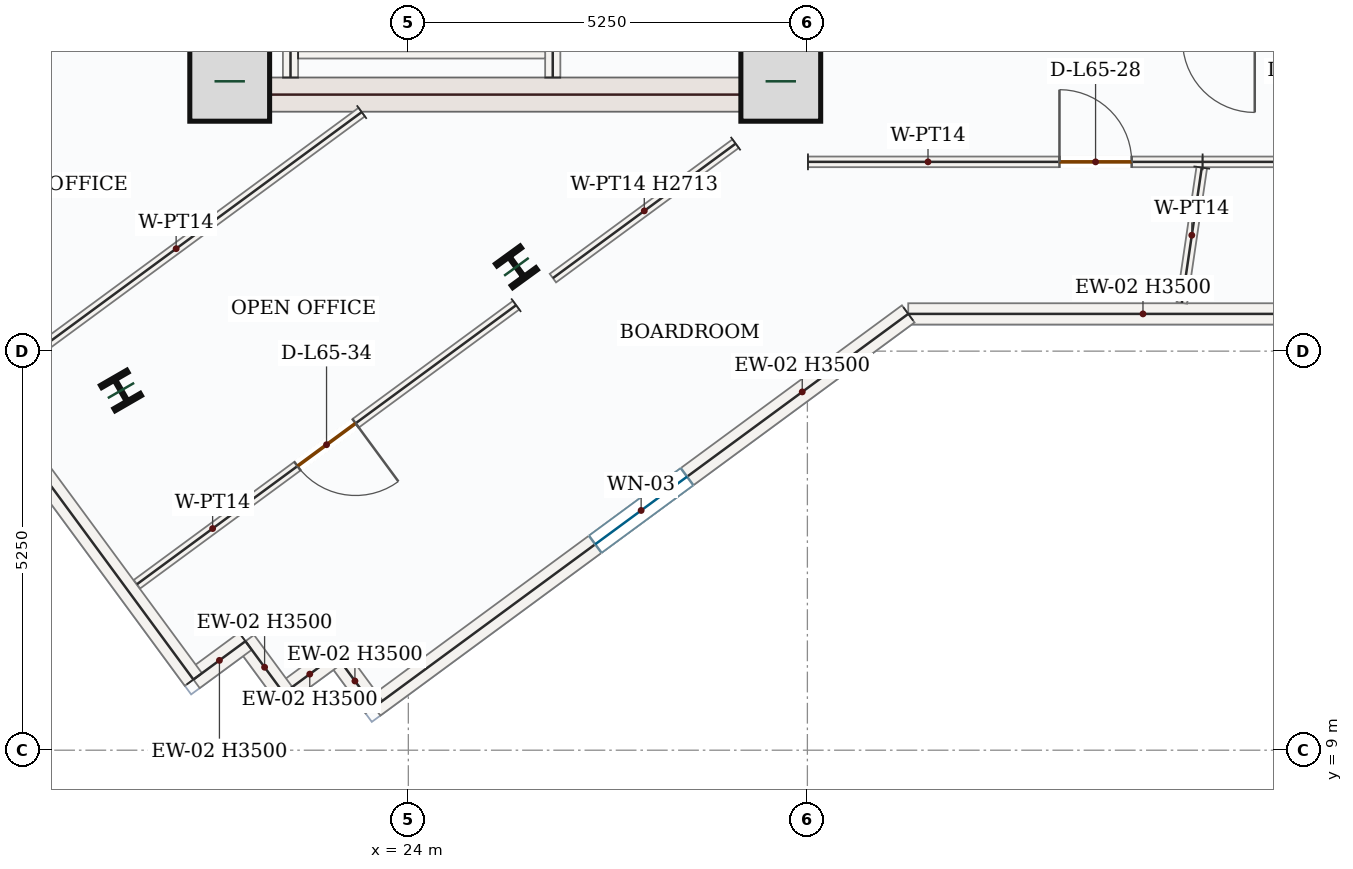
"""IFC4 building model, lengths in metres.
Left out: names, types, materials, properties, quantities, classifications, styles, units other than length and angle.
Written with IfcOpenShell. Run it as: python <this file> out.ifc"""

import sys

from ifc_helpers import new_model, si_unit, direction, frame, frame_2d, origin, origin_2d, place, context, subcontext, project, spatial, rectangle, i_section, extrude, source, transform, mapped, element, fill, save


model = new_model("IFC4")
c1 = context("Model", 3, precision=1e-05, world=origin(), true_north=direction((0.0, 1.0)))
c2 = subcontext(c1, "Body", "Model", "MODEL_VIEW")
j1 = project(units=[si_unit("LENGTHUNIT", "METRE"), si_unit("PLANEANGLEUNIT", "RADIAN")], contexts=[c1])
p1 = place(None, origin())
s1 = spatial("IfcSite", under=j1, at=p1, CompositionType="ELEMENT")
p2 = place(p1, origin())
s2 = spatial("IfcBuilding", under=s1, at=p2, CompositionType="ELEMENT")
p3 = place(p2, frame((0.0, 0.0, 272.85)))
s3 = spatial("IfcBuildingStorey", under=s2, at=p3, CompositionType="ELEMENT", Elevation=272.85)
m1 = source(origin(), c2, "Body", "SweptSolid", [
    extrude(rectangle(XDim=8.55, YDim=0.45, at=frame_2d((4.275, 0.0))), origin(), (0.0, 0.0, 1.0), 3.5),
])
p4 = place(p3, frame((21.475, 17.4, 0.0), z_axis=(0.0, 0.0, 1.0), x_axis=(0.0, 1.0, 0.0)))
e1 = element("IfcWall", 1, at=p4, inside=s3, PredefinedType="SHEAR", context=c2, shape_type="MappedRepresentation", body=[
    mapped(m1, transform((0.0, 0.0, 0.0), x_axis=(1.0, 0.0, 0.0), y_axis=(0.0, 1.0, 0.0), z_axis=(0.0, 0.0, 1.0), scale=1.0)),
])
p5 = place(p3, frame((29.025, 17.4, 0.0), z_axis=(0.0, 0.0, 1.0), x_axis=(0.0, 1.0, 0.0)))
e2 = element("IfcWall", 2, at=p5, inside=s3, PredefinedType="SHEAR", context=c2, shape_type="SweptSolid", body=[
    extrude(rectangle(XDim=8.55, YDim=0.45, at=frame_2d((4.275, 0.0))), origin(), (0.0, 0.0, 1.0), 3.5),
])
p6 = place(p5, frame((6.65, 0.0, 0.0)))
e3 = element("IfcOpeningElement", 3, at=p6, cuts=e2, PredefinedType="OPENING", context=c2, shape_type="SweptSolid", body=[
    extrude(rectangle(XDim=1.1, YDim=2.2, at=frame_2d((0.55, 1.1))), frame((0.0, 0.235, 0.0), z_axis=(0.0, -1.0, 0.0), x_axis=(1.0, 0.0, 0.0)), (0.0, 0.0, 1.0), 0.47),
])
p7 = place(p5, frame((2.7, 0.0, 0.0)))
e4 = element("IfcOpeningElement", 4, at=p7, cuts=e2, PredefinedType="OPENING", context=c2, shape_type="SweptSolid", body=[
    extrude(rectangle(XDim=0.88, YDim=2.1, at=frame_2d((0.44, 1.05))), frame((0.0, 0.235, 0.0), z_axis=(0.0, -1.0, 0.0), x_axis=(1.0, 0.0, 0.0)), (0.0, 0.0, 1.0), 0.47),
])
p8 = place(p5, frame((4.6, 0.0, 0.0)))
e5 = element("IfcOpeningElement", 5, at=p8, cuts=e2, PredefinedType="OPENING", context=c2, shape_type="SweptSolid", body=[
    extrude(rectangle(XDim=0.88, YDim=2.1, at=frame_2d((0.44, 1.05))), frame((0.0, 0.235, 0.0), z_axis=(0.0, -1.0, 0.0), x_axis=(1.0, 0.0, 0.0)), (0.0, 0.0, 1.0), 0.47),
])
m2 = source(origin(), c2, "Body", "SweptSolid", [
    extrude(rectangle(XDim=7.1, YDim=0.45, at=frame_2d((3.55, 0.0))), origin(), (0.0, 0.0, 1.0), 3.5),
])
p9 = place(p3, frame((21.7, 17.625, 0.0), z_axis=(0.0, 0.0, 1.0), x_axis=(1.0, 0.0, 0.0)))
e6 = element("IfcWall", 6, at=p9, inside=s3, PredefinedType="SHEAR", context=c2, shape_type="MappedRepresentation", body=[
    mapped(m2, transform((0.0, 0.0, 0.0), x_axis=(1.0, 0.0, 0.0), y_axis=(0.0, 1.0, 0.0), z_axis=(0.0, 0.0, 1.0), scale=1.0)),
])
m3 = source(origin(), c2, "Body", "SweptSolid", [
    extrude(rectangle(XDim=1.05, YDim=1.05, at=origin_2d()), origin(), (0.0, 0.0, 1.0), 3.75),
])
for number, where, z_axis, x_axis in (
    (7, (21.65, 17.8, 0.0), (0.0, 0.0, 1.0), (1.0, 0.0, 0.0)),
    (8, (28.9, 17.8, 0.0), (0.0, 0.0, 1.0), (1.0, 0.0, 0.0)),
):
    element("IfcColumn", number, at=place(p3, frame(where, z_axis=z_axis, x_axis=x_axis)), inside=s3, PredefinedType="COLUMN", context=c2, shape_type="MappedRepresentation", body=[
        mapped(m3, transform((0.0, 0.0, 0.0), x_axis=(1.0, 0.0, 0.0), y_axis=(0.0, 1.0, 0.0), z_axis=(0.0, 0.0, 1.0), scale=1.0)),
    ])
m4 = source(origin(), c2, "Body", "SweptSolid", [
    extrude(i_section(OverallWidth=0.399, OverallDepth=0.386, WebThickness=0.021, FlangeThickness=0.033, FilletRadius=0.018, at=origin_2d()), origin(), (0.0, 0.0, 1.0), 3.75),
])
for number, where, z_axis, x_axis in (
    (9, (25.422, 15.359, 0.0), (0.0, 0.0, 1.0), (0.809, 0.588, 0.0)),
    (10, (20.22, 13.732, 0.0), (0.0, 0.0, 1.0), (0.866, 0.5, 0.0)),
):
    element("IfcColumn", number, at=place(p3, frame(where, z_axis=z_axis, x_axis=x_axis)), inside=s3, PredefinedType="COLUMN", context=c2, shape_type="MappedRepresentation", body=[
        mapped(m4, transform((0.0, 0.0, 0.0), x_axis=(1.0, 0.0, 0.0), y_axis=(0.0, 1.0, 0.0), z_axis=(0.0, 0.0, 1.0), scale=1.0)),
    ])
m5 = source(origin(), c2, "Body", "SweptSolid", [
    extrude(rectangle(XDim=6.177, YDim=0.28, at=frame_2d((3.088, 0.0))), origin(), (0.0, 0.0, 1.0), 3.5),
])
p10 = place(p3, frame((36.753, 14.74, 0.0), z_axis=(0.0, 0.0, 1.0), x_axis=(-1.0, 0.0, 0.0)))
e11 = element("IfcWall", 11, at=p10, inside=s3, PredefinedType="SOLIDWALL", context=c2, shape_type="MappedRepresentation", body=[
    mapped(m5, transform((0.0, 0.0, 0.0), x_axis=(1.0, 0.0, 0.0), y_axis=(0.0, 1.0, 0.0), z_axis=(0.0, 0.0, 1.0), scale=1.0)),
])
p11 = place(p3, frame((30.577, 14.74, 0.0), z_axis=(0.0, 0.0, 1.0), x_axis=(-0.805403112922, -0.592727446383, 0.0)))
e12 = element("IfcWall", 12, at=p11, inside=s3, PredefinedType="SOLIDWALL", context=c2, shape_type="SweptSolid", body=[
    extrude(rectangle(XDim=8.726, YDim=0.28, at=frame_2d((4.363, 0.0))), origin(), (0.0, 0.0, 1.0), 3.5),
])
p12 = place(p11, frame((3.613, 0.0, 0.85)))
e13 = element("IfcOpeningElement", 13, at=p12, cuts=e12, PredefinedType="OPENING", context=c2, shape_type="SweptSolid", body=[
    extrude(rectangle(XDim=1.5, YDim=1.5, at=frame_2d((0.75, 0.75))), frame((0.0, 0.15, 0.0), z_axis=(0.0, -1.0, 0.0), x_axis=(1.0, 0.0, 0.0)), (0.0, 0.0, 1.0), 0.3),
])
m6 = source(origin(), c2, "Body", "SweptSolid", [
    extrude(rectangle(XDim=0.85, YDim=0.28, at=frame_2d((0.425, 0.0))), origin(), (0.0, 0.0, 1.0), 3.5),
])
p13 = place(p3, frame((23.549, 9.568, 0.0), z_axis=(0.0, 0.0, 1.0), x_axis=(-0.592807079659, 0.80534450163, 0.0)))
e14 = element("IfcWall", 14, at=p13, inside=s3, PredefinedType="SOLIDWALL", context=c2, shape_type="MappedRepresentation", body=[
    mapped(m6, transform((0.0, 0.0, 0.0), x_axis=(1.0, 0.0, 0.0), y_axis=(0.0, 1.0, 0.0), z_axis=(0.0, 0.0, 1.0), scale=1.0)),
])
m7 = source(origin(), c2, "Body", "SweptSolid", [
    extrude(rectangle(XDim=0.85, YDim=0.28, at=frame_2d((0.425, 0.0))), origin(), (0.0, 0.0, 1.0), 3.5),
])
for number, where, z_axis, x_axis in (
    (15, (23.045, 10.253, 0.0), (0.0, 0.0, 1.0), (-0.805, -0.593, 0.0)),
    (16, (22.361, 9.749, 0.0), (0.0, 0.0, 1.0), (-0.593, 0.805, 0.0)),
):
    element("IfcWall", number, at=place(p3, frame(where, z_axis=z_axis, x_axis=x_axis)), inside=s3, PredefinedType="SOLIDWALL", context=c2, shape_type="MappedRepresentation", body=[
        mapped(m7, transform((0.0, 0.0, 0.0), x_axis=(1.0, 0.0, 0.0), y_axis=(0.0, 1.0, 0.0), z_axis=(0.0, 0.0, 1.0), scale=1.0)),
    ])
p14 = place(p3, frame((21.857, 10.434, 0.0), z_axis=(0.0, 0.0, 1.0), x_axis=(-0.80534450163, -0.592807079659, 0.0)))
e17 = element("IfcWall", 17, at=p14, inside=s3, PredefinedType="SOLIDWALL", context=c2, shape_type="MappedRepresentation", body=[
    mapped(m6, transform((0.0, 0.0, 0.0), x_axis=(1.0, 0.0, 0.0), y_axis=(0.0, 1.0, 0.0), z_axis=(0.0, 0.0, 1.0), scale=1.0)),
])
m8 = source(origin(), c2, "Body", "SweptSolid", [
    extrude(rectangle(XDim=9.92, YDim=0.28, at=frame_2d((4.96, 0.0))), origin(), (0.0, 0.0, 1.0), 3.5),
])
p15 = place(p3, frame((21.173, 9.93, 0.0), z_axis=(0.0, 0.0, 1.0), x_axis=(-0.592722097771, 0.805407049146, 0.0)))
e18 = element("IfcWall", 18, at=p15, inside=s3, PredefinedType="SOLIDWALL", context=c2, shape_type="MappedRepresentation", body=[
    mapped(m8, transform((0.0, 0.0, 0.0), x_axis=(1.0, 0.0, 0.0), y_axis=(0.0, 1.0, 0.0), z_axis=(0.0, 0.0, 1.0), scale=1.0)),
])
m9 = source(origin(), c2, "Body", "SweptSolid", [
    extrude(rectangle(XDim=7.87, YDim=0.2, at=frame_2d((3.935, 0.0))), origin(), (0.0, 0.0, 1.0), 3.5),
])
p16 = place(p3, frame((22.45, 17.85, 0.0), z_axis=(0.0, 0.0, 1.0), x_axis=(0.0, 1.0, 0.0)))
e19 = element("IfcWall", 19, at=p16, inside=s3, PredefinedType="SOLIDWALL", context=c2, shape_type="MappedRepresentation", body=[
    mapped(m9, transform((0.0, 0.0, 0.0), x_axis=(1.0, 0.0, 0.0), y_axis=(0.0, 1.0, 0.0), z_axis=(0.0, 0.0, 1.0), scale=1.0)),
])
p17 = place(p3, frame((25.9, 17.85, 0.0), z_axis=(0.0, 0.0, 1.0), x_axis=(0.0, 1.0, 0.0)))
e20 = element("IfcWall", 20, at=p17, inside=s3, PredefinedType="SOLIDWALL", context=c2, shape_type="SweptSolid", body=[
    extrude(rectangle(XDim=8.0, YDim=0.2, at=frame_2d((4.0, 0.0))), origin(), (0.0, 0.0, 1.0), 3.5),
])
p18 = place(p17, frame((6.2, 0.0, 0.0)))
e21 = element("IfcOpeningElement", 21, at=p18, cuts=e20, PredefinedType="OPENING", context=c2, shape_type="SweptSolid", body=[
    extrude(rectangle(XDim=1.0, YDim=2.15, at=frame_2d((0.5, 1.075))), frame((0.0, 0.11, 0.0), z_axis=(0.0, -1.0, 0.0), x_axis=(1.0, 0.0, 0.0)), (0.0, 0.0, 1.0), 0.22),
])
p19 = place(p17, frame((0.6, 0.0, 0.0)))
e22 = element("IfcOpeningElement", 22, at=p19, cuts=e20, PredefinedType="OPENING", context=c2, shape_type="SweptSolid", body=[
    extrude(rectangle(XDim=0.88, YDim=2.1, at=frame_2d((0.44, 1.05))), frame((0.0, 0.11, 0.0), z_axis=(0.0, -1.0, 0.0), x_axis=(1.0, 0.0, 0.0)), (0.0, 0.0, 1.0), 0.22),
])
m10 = source(origin(), c2, "Body", "SweptSolid", [
    extrude(rectangle(XDim=3.25, YDim=0.2, at=frame_2d((1.625, 0.0))), origin(), (0.0, 0.0, 1.0), 3.5),
])
p20 = place(p3, frame((22.55, 18.2, 0.0), z_axis=(0.0, 0.0, 1.0), x_axis=(1.0, 0.0, 0.0)))
e23 = element("IfcWall", 23, at=p20, inside=s3, PredefinedType="SOLIDWALL", context=c2, shape_type="MappedRepresentation", body=[
    mapped(m10, transform((0.0, 0.0, 0.0), x_axis=(1.0, 0.0, 0.0), y_axis=(0.0, 1.0, 0.0), z_axis=(0.0, 0.0, 1.0), scale=1.0)),
])
m11 = source(origin(), c2, "Body", "SweptSolid", [
    extrude(rectangle(XDim=6.063, YDim=0.14, at=frame_2d((3.032, 0.0))), origin(), (0.0, 0.0, 1.0), 3.5),
])
p21 = place(p3, frame((23.387, 17.395, 0.0), z_axis=(0.0, 0.0, 1.0), x_axis=(-0.805422045282, -0.59270172007, 0.0)))
e24 = element("IfcWall", 24, at=p21, inside=s3, PredefinedType="PARTITIONING", context=c2, shape_type="MappedRepresentation", body=[
    mapped(m11, transform((0.0, 0.0, 0.0), x_axis=(1.0, 0.0, 0.0), y_axis=(0.0, 1.0, 0.0), z_axis=(0.0, 0.0, 1.0), scale=1.0)),
])
p22 = place(p3, frame((16.589, 16.403, 0.0), z_axis=(0.0, 0.0, 1.0), x_axis=(0.80540492624, 0.592724982423, 0.0)))
e25 = element("IfcWall", 25, at=p22, inside=s3, PredefinedType="PARTITIONING", context=c2, shape_type="SweptSolid", body=[
    extrude(rectangle(XDim=5.781, YDim=0.14, at=frame_2d((2.891, 0.0))), origin(), (0.0, 0.0, 1.0), 3.5),
])
p23 = place(p22, frame((3.14, 0.0, 0.0)))
e26 = element("IfcOpeningElement", 26, at=p23, cuts=e25, PredefinedType="OPENING", context=c2, shape_type="SweptSolid", body=[
    extrude(rectangle(XDim=0.95, YDim=2.15, at=frame_2d((0.475, 1.075))), frame((0.0, 0.08, 0.0), z_axis=(0.0, -1.0, 0.0), x_axis=(1.0, 0.0, 0.0)), (0.0, 0.0, 1.0), 0.16),
])
m12 = source(origin(), c2, "Body", "SweptSolid", [
    extrude(rectangle(XDim=2.985, YDim=0.14, at=frame_2d((1.492, 0.0))), origin(), (0.0, 0.0, 1.0), 2.713),
])
p24 = place(p3, frame((28.306, 16.98, 0.0), z_axis=(0.0, 0.0, 1.0), x_axis=(-0.80539491033, -0.592738591973, 0.0)))
e27 = element("IfcWall", 27, at=p24, inside=s3, PredefinedType="PARTITIONING", context=c2, shape_type="MappedRepresentation", body=[
    mapped(m12, transform((0.0, 0.0, 0.0), x_axis=(1.0, 0.0, 0.0), y_axis=(0.0, 1.0, 0.0), z_axis=(0.0, 0.0, 1.0), scale=1.0)),
])
p25 = place(p3, frame((25.418, 14.854, 0.0), z_axis=(0.0, 0.0, 1.0), x_axis=(-0.805402487917, -0.592728295645, 0.0)))
e28 = element("IfcWall", 28, at=p25, inside=s3, PredefinedType="PARTITIONING", context=c2, shape_type="SweptSolid", body=[
    extrude(rectangle(XDim=6.193, YDim=0.14, at=frame_2d((3.097, 0.0))), origin(), (0.0, 0.0, 1.0), 3.5),
])
p26 = place(p25, frame((2.622, 0.0, 0.0)))
e29 = element("IfcOpeningElement", 29, at=p26, cuts=e28, PredefinedType="OPENING", context=c2, shape_type="SweptSolid", body=[
    extrude(rectangle(XDim=0.95, YDim=2.15, at=frame_2d((0.475, 1.075))), frame((0.0, 0.08, 0.0), z_axis=(0.0, -1.0, 0.0), x_axis=(1.0, 0.0, 0.0)), (0.0, 0.0, 1.0), 0.16),
])
p27 = place(p3, frame((29.258, 16.74, 0.0), z_axis=(0.0, 0.0, 1.0), x_axis=(0.999999998895, -4.7021207e-05, 0.0)))
e30 = element("IfcWall", 30, at=p27, inside=s3, PredefinedType="PARTITIONING", context=c2, shape_type="SweptSolid", body=[
    extrude(rectangle(XDim=5.192, YDim=0.14, at=frame_2d((2.596, 0.0))), origin(), (0.0, 0.0, 1.0), 3.5),
])
p28 = place(p27, frame((3.309, 0.0, 0.0)))
e31 = element("IfcOpeningElement", 31, at=p28, cuts=e30, PredefinedType="OPENING", context=c2, shape_type="SweptSolid", body=[
    extrude(rectangle(XDim=0.95, YDim=2.15, at=frame_2d((0.475, 1.075))), frame((0.0, 0.08, 0.0), z_axis=(0.0, -1.0, 0.0), x_axis=(1.0, 0.0, 0.0)), (0.0, 0.0, 1.0), 0.16),
])
m13 = source(origin(), c2, "Body", "SweptSolid", [
    extrude(rectangle(XDim=1.799, YDim=0.14, at=frame_2d((0.9, 0.0))), origin(), (0.0, 0.0, 1.0), 3.5),
])
p29 = place(p3, frame((34.439, 16.665, 0.0), z_axis=(0.0, 0.0, 1.0), x_axis=(-0.14573227875, -0.989324063657, 0.0)))
e32 = element("IfcWall", 32, at=p29, inside=s3, PredefinedType="PARTITIONING", context=c2, shape_type="MappedRepresentation", body=[
    mapped(m13, transform((0.0, 0.0, 0.0), x_axis=(1.0, 0.0, 0.0), y_axis=(0.0, 1.0, 0.0), z_axis=(0.0, 0.0, 1.0), scale=1.0)),
])
p30 = place(p3, frame((34.45, 16.74, 0.0), z_axis=(0.0, 0.0, 1.0), x_axis=(1.0, 0.0, 0.0)))
e33 = element("IfcWall", 33, at=p30, inside=s3, PredefinedType="PARTITIONING", context=c2, shape_type="SweptSolid", body=[
    extrude(rectangle(XDim=5.388, YDim=0.14, at=frame_2d((2.694, 0.0))), origin(), (0.0, 0.0, 1.0), 3.5),
])
p31 = place(p30, frame((0.976, 0.0, 0.0)))
e34 = element("IfcOpeningElement", 34, at=p31, cuts=e33, PredefinedType="OPENING", context=c2, shape_type="SweptSolid", body=[
    extrude(rectangle(XDim=0.95, YDim=2.15, at=frame_2d((0.475, 1.075))), frame((0.0, 0.08, 0.0), z_axis=(0.0, -1.0, 0.0), x_axis=(1.0, 0.0, 0.0)), (0.0, 0.0, 1.0), 0.16),
])
m14 = source(origin(), c2, "Body", "SweptSolid", [
    extrude(rectangle(XDim=1.5, YDim=1.5, at=frame_2d((0.75, 0.75))), frame((0.0, 0.03, 0.0), z_axis=(0.0, -1.0, 0.0), x_axis=(1.0, 0.0, 0.0)), (0.0, 0.0, 1.0), 0.06),
])
p32 = place(p12, origin())
e35 = element("IfcWindow", 35, at=p32, inside=s3, PartitioningType="SINGLE_PANEL", PredefinedType="WINDOW", context=c2, shape_type="MappedRepresentation", body=[
    mapped(m14, transform((0.0, 0.0, 0.0), x_axis=(1.0, 0.0, 0.0), y_axis=(0.0, 1.0, 0.0), z_axis=(0.0, 0.0, 1.0), scale=1.0)),
])
fill(e13, e35)
m15 = source(origin(), c2, "Body", "SweptSolid", [
    extrude(rectangle(XDim=0.95, YDim=2.15, at=frame_2d((0.475, 1.075))), frame((0.0, 0.025, 0.0), z_axis=(0.0, -1.0, 0.0), x_axis=(1.0, 0.0, 0.0)), (0.0, 0.0, 1.0), 0.05),
])
p33 = place(p28, origin())
e36 = element("IfcDoor", 36, at=p33, inside=s3, OperationType="SINGLE_SWING_LEFT", PredefinedType="DOOR", context=c2, shape_type="MappedRepresentation", body=[
    mapped(m15, transform((0.0, 0.0, 0.0), x_axis=(1.0, 0.0, 0.0), y_axis=(0.0, 1.0, 0.0), z_axis=(0.0, 0.0, 1.0), scale=1.0)),
])
fill(e31, e36)
p34 = place(p26, origin())
e37 = element("IfcDoor", 37, at=p34, inside=s3, OperationType="SINGLE_SWING_LEFT", PredefinedType="DOOR", context=c2, shape_type="MappedRepresentation", body=[
    mapped(m15, transform((0.0, 0.0, 0.0), x_axis=(1.0, 0.0, 0.0), y_axis=(0.0, 1.0, 0.0), z_axis=(0.0, 0.0, 1.0), scale=1.0)),
])
fill(e29, e37)
save(model, sys.argv[1])
